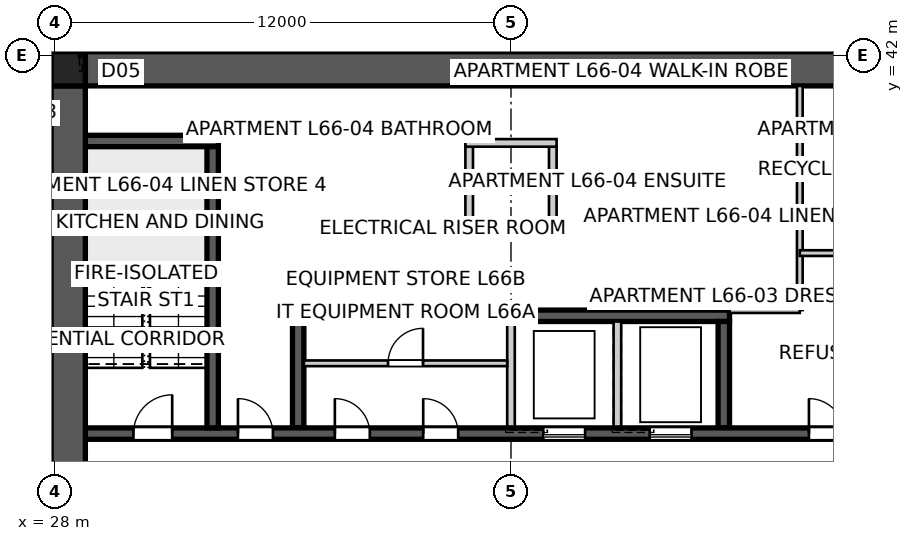
"""IFC4 building model, lengths in metres.
Left out: names, types, materials, properties, quantities, classifications, styles, units other than length and angle.
Written with IfcOpenShell. Run it as: python <this file> out.ifc"""

import sys

from ifc_helpers import new_model, si_unit, direction, frame, frame_2d, origin, origin_2d, place, context, subcontext, project, spatial, polyline, rectangle, outline, extrude, element, fill, save


model = new_model("IFC4")
c1 = context("Model", 3, precision=1e-05, world=origin(), true_north=direction((0.0, 1.0)))
c2 = subcontext(c1, "Body", "Model", "MODEL_VIEW")
j1 = project(units=[si_unit("LENGTHUNIT", "METRE"), si_unit("PLANEANGLEUNIT", "RADIAN")], contexts=[c1])
p1 = place(None, origin())
s1 = spatial("IfcSite", under=j1, at=p1, CompositionType="ELEMENT")
p2 = place(p1, origin())
s2 = spatial("IfcBuilding", under=s1, at=p2, CompositionType="ELEMENT")
p3 = place(p2, frame((0.0, 0.0, 240.4)))
s3 = spatial("IfcBuildingStorey", under=s2, at=p3, CompositionType="ELEMENT", Elevation=240.4)
p4 = place(p3, frame((28.8, 41.65, 0.0), z_axis=(0.0, 0.0, 1.0), x_axis=(1.0, 0.0, 0.0)))
e1 = element("IfcWall", 1, at=p4, inside=s3, PredefinedType="SHEAR", context=c2, shape_type="SweptSolid", body=[
    extrude(outline(polyline([(0.0, -0.45), (22.4, -0.45), (22.4, -0.025), (22.85, -0.025), (22.85, 0.025), (22.4, 0.025), (22.4, 0.45), (0.0, 0.45), (0.0, 0.025), (-0.45, 0.025), (-0.45, -0.025), (0.0, -0.025), (0.0, -0.45)])), origin(), (0.0, 0.0, 1.0), 3.4),
])
p5 = place(p3, frame((28.35, 41.2, 0.0), z_axis=(0.0, 0.0, 1.0), x_axis=(0.0, -1.0, 0.0)))
e2 = element("IfcWall", 2, at=p5, inside=s3, PredefinedType="SHEAR", context=c2, shape_type="SweptSolid", body=[
    extrude(outline(polyline([(0.0, -0.45), (22.4, -0.45), (22.4, -0.025), (22.85, -0.025), (22.85, 0.025), (22.4, 0.025), (22.4, 0.45), (0.0, 0.45), (0.0, 0.025), (-0.45, 0.025), (-0.45, -0.025), (0.0, -0.025), (0.0, -0.45)])), origin(), (0.0, 0.0, 1.0), 3.4),
])
p6 = place(p5, frame((11.14, 0.0, 0.0)))
e3 = element("IfcOpeningElement", 3, at=p6, cuts=e2, PredefinedType="OPENING", context=c2, shape_type="SweptSolid", body=[
    extrude(rectangle(XDim=1.02, YDim=2.4, at=frame_2d((0.51, 1.2))), frame((0.0, 0.46, 0.0), z_axis=(0.0, -1.0, 0.0), x_axis=(1.0, 0.0, 0.0)), (0.0, 0.0, 1.0), 0.92),
])
p7 = place(p3, frame((28.8, 32.05, 0.0), z_axis=(0.0, 0.0, 1.0), x_axis=(1.0, 0.0, 0.0)))
e4 = element("IfcWall", 4, at=p7, inside=s3, PredefinedType="SHEAR", context=c2, shape_type="SweptSolid", body=[
    extrude(rectangle(XDim=22.4, YDim=0.3, at=frame_2d((11.2, 0.0))), origin(), (0.0, 0.0, 1.0), 3.4),
])
p8 = place(p7, frame((19.04, 0.0, 0.0)))
e5 = element("IfcOpeningElement", 5, at=p8, cuts=e4, PredefinedType="OPENING", context=c2, shape_type="SweptSolid", body=[
    extrude(rectangle(XDim=0.92, YDim=2.1, at=frame_2d((0.46, 1.05))), frame((0.0, 0.16, 0.0), z_axis=(0.0, -1.0, 0.0), x_axis=(1.0, 0.0, 0.0)), (0.0, 0.0, 1.0), 0.32),
])
p9 = place(p7, frame((1.265, 0.0, 0.0)))
e6 = element("IfcOpeningElement", 6, at=p9, cuts=e4, PredefinedType="OPENING", context=c2, shape_type="SweptSolid", body=[
    extrude(rectangle(XDim=1.02, YDim=2.1, at=frame_2d((0.51, 1.05))), frame((0.0, 0.16, 0.0), z_axis=(0.0, -1.0, 0.0), x_axis=(1.0, 0.0, 0.0)), (0.0, 0.0, 1.0), 0.32),
])
p10 = place(p7, frame((4.015, 0.0, 0.0)))
e7 = element("IfcOpeningElement", 7, at=p10, cuts=e4, PredefinedType="OPENING", context=c2, shape_type="SweptSolid", body=[
    extrude(rectangle(XDim=0.92, YDim=2.1, at=frame_2d((0.46, 1.05))), frame((0.0, 0.16, 0.0), z_axis=(0.0, -1.0, 0.0), x_axis=(1.0, 0.0, 0.0)), (0.0, 0.0, 1.0), 0.32),
])
p11 = place(p7, frame((6.565, 0.0, 0.0)))
e8 = element("IfcOpeningElement", 8, at=p11, cuts=e4, PredefinedType="OPENING", context=c2, shape_type="SweptSolid", body=[
    extrude(rectangle(XDim=0.92, YDim=2.1, at=frame_2d((0.46, 1.05))), frame((0.0, 0.16, 0.0), z_axis=(0.0, -1.0, 0.0), x_axis=(1.0, 0.0, 0.0)), (0.0, 0.0, 1.0), 0.32),
])
p12 = place(p7, frame((8.89, 0.0, 0.0)))
e9 = element("IfcOpeningElement", 9, at=p12, cuts=e4, PredefinedType="OPENING", context=c2, shape_type="SweptSolid", body=[
    extrude(rectangle(XDim=0.92, YDim=2.1, at=frame_2d((0.46, 1.05))), frame((0.0, 0.16, 0.0), z_axis=(0.0, -1.0, 0.0), x_axis=(1.0, 0.0, 0.0)), (0.0, 0.0, 1.0), 0.32),
])
p13 = place(p7, frame((12.05, 0.0, 0.0)))
e10 = element("IfcOpeningElement", 10, at=p13, cuts=e4, PredefinedType="OPENING", context=c2, shape_type="SweptSolid", body=[
    extrude(rectangle(XDim=1.1, YDim=2.1, at=frame_2d((0.55, 1.05))), frame((0.0, 0.16, 0.0), z_axis=(0.0, -1.0, 0.0), x_axis=(1.0, 0.0, 0.0)), (0.0, 0.0, 1.0), 0.32),
])
p14 = place(p7, frame((14.85, 0.0, 0.0)))
e11 = element("IfcOpeningElement", 11, at=p14, cuts=e4, PredefinedType="OPENING", context=c2, shape_type="SweptSolid", body=[
    extrude(rectangle(XDim=1.1, YDim=2.1, at=frame_2d((0.55, 1.05))), frame((0.0, 0.16, 0.0), z_axis=(0.0, -1.0, 0.0), x_axis=(1.0, 0.0, 0.0)), (0.0, 0.0, 1.0), 0.32),
])
p15 = place(p3, frame((34.25, 35.15, 0.0), z_axis=(0.0, 0.0, 1.0), x_axis=(1.0, 0.0, 0.0)))
e12 = element("IfcWall", 12, at=p15, inside=s3, PredefinedType="SHEAR", context=c2, shape_type="SweptSolid", body=[
    extrude(rectangle(XDim=11.5, YDim=0.3, at=frame_2d((5.75, 0.0))), origin(), (0.0, 0.0, 1.0), 3.4),
])
p16 = place(p3, frame((34.4, 32.2, 0.0), z_axis=(0.0, 0.0, 1.0), x_axis=(0.0, 1.0, 0.0)))
e13 = element("IfcWall", 13, at=p16, inside=s3, PredefinedType="SHEAR", context=c2, shape_type="SweptSolid", body=[
    extrude(rectangle(XDim=2.8, YDim=0.3, at=frame_2d((1.4, 0.0))), origin(), (0.0, 0.0, 1.0), 3.4),
])
for number, where, z_axis, x_axis in (
    (14, (40.0, 32.2, 0.0), (0.0, 0.0, 1.0), (0.0, 1.0, 0.0)),
    (15, (42.8, 32.2, 0.0), (0.0, 0.0, 1.0), (0.0, 1.0, 0.0)),
):
    element("IfcWall", number, at=place(p3, frame(where, z_axis=z_axis, x_axis=x_axis)), inside=s3, PredefinedType="SOLIDWALL", context=c2, shape_type="SweptSolid", body=[
        extrude(rectangle(XDim=2.8, YDim=0.2, at=frame_2d((1.4, 0.0))), origin(), (0.0, 0.0, 1.0), 3.4),
    ])
p17 = place(p3, frame((45.6, 32.2, 0.0), z_axis=(0.0, 0.0, 1.0), x_axis=(0.0, 1.0, 0.0)))
e16 = element("IfcWall", 16, at=p17, inside=s3, PredefinedType="SHEAR", context=c2, shape_type="SweptSolid", body=[
    extrude(rectangle(XDim=2.8, YDim=0.3, at=frame_2d((1.4, 0.0))), origin(), (0.0, 0.0, 1.0), 3.4),
])
p18 = place(p3, frame((32.15, 32.2, 0.0), z_axis=(0.0, 0.0, 1.0), x_axis=(0.0, 1.0, 0.0)))
e17 = element("IfcWall", 17, at=p18, inside=s3, PredefinedType="SHEAR", context=c2, shape_type="SweptSolid", body=[
    extrude(rectangle(XDim=7.7, YDim=0.3, at=frame_2d((3.85, 0.0))), origin(), (0.0, 0.0, 1.0), 3.4),
])
p19 = place(p3, frame((28.8, 39.75, 0.0), z_axis=(0.0, 0.0, 1.0), x_axis=(1.0, 0.0, 0.0)))
e18 = element("IfcWall", 18, at=p19, inside=s3, PredefinedType="SHEAR", context=c2, shape_type="SweptSolid", body=[
    extrude(rectangle(XDim=3.5, YDim=0.3, at=frame_2d((1.75, 0.0))), origin(), (0.0, 0.0, 1.0), 3.4),
])
for number, where, z_axis, x_axis in (
    (19, (38.9, 37.6, 0.0), (0.0, 0.0, 1.0), (0.0, 1.0, 0.0)),
    (20, (41.1, 37.6, 0.0), (0.0, 0.0, 1.0), (0.0, 1.0, 0.0)),
):
    element("IfcWall", number, at=place(p3, frame(where, z_axis=z_axis, x_axis=x_axis)), inside=s3, PredefinedType="SOLIDWALL", context=c2, shape_type="SweptSolid", body=[
        extrude(rectangle(XDim=2.0, YDim=0.2, at=frame_2d((1.0, 0.0))), origin(), (0.0, 0.0, 1.0), 3.4),
    ])
for number, where, z_axis, x_axis in (
    (21, (38.8, 37.5, 0.0), (0.0, 0.0, 1.0), (1.0, 0.0, 0.0)),
    (22, (38.8, 39.7, 0.0), (0.0, 0.0, 1.0), (1.0, 0.0, 0.0)),
):
    element("IfcWall", number, at=place(p3, frame(where, z_axis=z_axis, x_axis=x_axis)), inside=s3, PredefinedType="SOLIDWALL", context=c2, shape_type="SweptSolid", body=[
        extrude(rectangle(XDim=2.4, YDim=0.2, at=frame_2d((1.2, 0.0))), origin(), (0.0, 0.0, 1.0), 3.4),
    ])
p20 = place(p3, frame((28.35, 41.65, 0.0), z_axis=(0.0, 0.0, 1.0), x_axis=(1.0, 0.0, 0.0)))
e23 = element("IfcColumn", 23, at=p20, inside=s3, PredefinedType="COLUMN", context=c2, shape_type="SweptSolid", body=[
    extrude(rectangle(XDim=0.9, YDim=0.9, at=origin_2d()), origin(), (0.0, 0.0, 1.0), 3.4),
])
p21 = place(p3, frame((47.6, 41.2, 0.0), z_axis=(0.0, 0.0, 1.0), x_axis=(0.0, -1.0, 0.0)))
e24 = element("IfcWall", 24, at=p21, inside=s3, PredefinedType="SOLIDWALL", context=c2, shape_type="SweptSolid", body=[
    extrude(rectangle(XDim=5.9, YDim=0.15, at=frame_2d((2.95, 0.0))), origin(), (0.0, 0.0, 1.0), 3.25),
])
p22 = place(p3, frame((47.6, 35.3, 0.0), z_axis=(0.0, 0.0, 1.0), x_axis=(-1.0, 0.0, 0.0)))
e25 = element("IfcWall", 25, at=p22, inside=s3, PredefinedType="SOLIDWALL", context=c2, shape_type="SweptSolid", body=[
    extrude(rectangle(XDim=1.85, YDim=0.15, at=frame_2d((0.925, 0.0))), origin(), (0.0, 0.0, 1.0), 3.25),
])
p23 = place(p3, frame((47.6, 36.8, 0.0), z_axis=(0.0, 0.0, 1.0), x_axis=(1.0, 0.0, 0.0)))
e26 = element("IfcWall", 26, at=p23, inside=s3, PredefinedType="SOLIDWALL", context=c2, shape_type="SweptSolid", body=[
    extrude(rectangle(XDim=3.6, YDim=0.15, at=frame_2d((1.8, 0.0))), origin(), (0.0, 0.0, 1.0), 3.25),
])
p24 = place(p23, frame((1.34, 0.0, 0.0)))
e27 = element("IfcOpeningElement", 27, at=p24, cuts=e26, PredefinedType="OPENING", context=c2, shape_type="SweptSolid", body=[
    extrude(rectangle(XDim=0.92, YDim=2.1, at=frame_2d((0.46, 1.05))), frame((0.0, 0.085, 0.0), z_axis=(0.0, -1.0, 0.0), x_axis=(1.0, 0.0, 0.0)), (0.0, 0.0, 1.0), 0.17),
])
p25 = place(p3, frame((28.708, 41.18, 0.0), z_axis=(0.0, 0.0, 1.0), x_axis=(0.0, 1.0, 0.0)))
e28 = element("IfcWall", 28, at=p25, inside=s3, PredefinedType="PARTITIONING", context=c2, shape_type="SweptSolid", body=[
    extrude(rectangle(XDim=2.458, YDim=0.12, at=frame_2d((1.229, 0.0))), origin(), (0.0, 0.0, 1.0), 3.25),
])
p26 = place(p25, frame((1.259, 0.0, 0.0)))
e29 = element("IfcOpeningElement", 29, at=p26, cuts=e28, PredefinedType="OPENING", context=c2, shape_type="SweptSolid", body=[
    extrude(rectangle(XDim=0.96, YDim=2.1, at=frame_2d((0.48, 1.05))), frame((0.0, 0.07, 0.0), z_axis=(0.0, -1.0, 0.0), x_axis=(1.0, 0.0, 0.0)), (0.0, 0.0, 1.0), 0.14),
])
p27 = place(p3, frame((34.55, 33.9, 0.0), z_axis=(0.0, 0.0, 1.0), x_axis=(1.0, 0.0, 0.0)))
e30 = element("IfcWall", 30, at=p27, inside=s3, PredefinedType="SOLIDWALL", context=c2, shape_type="SweptSolid", body=[
    extrude(rectangle(XDim=5.35, YDim=0.15, at=frame_2d((2.675, 0.0))), origin(), (0.0, 0.0, 1.0), 3.25),
])
p28 = place(p27, frame((2.215, 0.0, 0.0)))
e31 = element("IfcOpeningElement", 31, at=p28, cuts=e30, PredefinedType="OPENING", context=c2, shape_type="SweptSolid", body=[
    extrude(rectangle(XDim=0.92, YDim=2.1, at=frame_2d((0.46, 1.05))), frame((0.0, 0.085, 0.0), z_axis=(0.0, -1.0, 0.0), x_axis=(1.0, 0.0, 0.0)), (0.0, 0.0, 1.0), 0.17),
])
p29 = place(p8, origin())
e32 = element("IfcDoor", 32, at=p29, inside=s3, OperationType="SINGLE_SWING_LEFT", PredefinedType="DOOR", context=c2, shape_type="SweptSolid", body=[
    extrude(rectangle(XDim=0.92, YDim=2.1, at=frame_2d((0.46, 1.05))), frame((0.0, 0.025, 0.0), z_axis=(0.0, -1.0, 0.0), x_axis=(1.0, 0.0, 0.0)), (0.0, 0.0, 1.0), 0.05),
])
fill(e5, e32)
p30 = place(p9, origin())
e33 = element("IfcDoor", 33, at=p30, inside=s3, OperationType="SINGLE_SWING_RIGHT", PredefinedType="DOOR", context=c2, shape_type="SweptSolid", body=[
    extrude(rectangle(XDim=1.02, YDim=2.1, at=frame_2d((0.51, 1.05))), frame((0.0, 0.025, 0.0), z_axis=(0.0, -1.0, 0.0), x_axis=(1.0, 0.0, 0.0)), (0.0, 0.0, 1.0), 0.05),
])
fill(e6, e33)
p31 = place(p10, origin())
e34 = element("IfcDoor", 34, at=p31, inside=s3, OperationType="SINGLE_SWING_LEFT", PredefinedType="DOOR", context=c2, shape_type="SweptSolid", body=[
    extrude(rectangle(XDim=0.92, YDim=2.1, at=frame_2d((0.46, 1.05))), frame((0.0, 0.025, 0.0), z_axis=(0.0, -1.0, 0.0), x_axis=(1.0, 0.0, 0.0)), (0.0, 0.0, 1.0), 0.05),
])
fill(e7, e34)
p32 = place(p11, origin())
e35 = element("IfcDoor", 35, at=p32, inside=s3, OperationType="SINGLE_SWING_LEFT", PredefinedType="DOOR", context=c2, shape_type="SweptSolid", body=[
    extrude(rectangle(XDim=0.92, YDim=2.1, at=frame_2d((0.46, 1.05))), frame((0.0, 0.025, 0.0), z_axis=(0.0, -1.0, 0.0), x_axis=(1.0, 0.0, 0.0)), (0.0, 0.0, 1.0), 0.05),
])
fill(e8, e35)
p33 = place(p12, origin())
e36 = element("IfcDoor", 36, at=p33, inside=s3, OperationType="SINGLE_SWING_LEFT", PredefinedType="DOOR", context=c2, shape_type="SweptSolid", body=[
    extrude(rectangle(XDim=0.92, YDim=2.1, at=frame_2d((0.46, 1.05))), frame((0.0, 0.025, 0.0), z_axis=(0.0, -1.0, 0.0), x_axis=(1.0, 0.0, 0.0)), (0.0, 0.0, 1.0), 0.05),
])
fill(e9, e36)
p34 = place(p28, origin())
e37 = element("IfcDoor", 37, at=p34, inside=s3, OperationType="SINGLE_SWING_RIGHT", PredefinedType="DOOR", context=c2, shape_type="SweptSolid", body=[
    extrude(rectangle(XDim=0.92, YDim=2.1, at=frame_2d((0.46, 1.05))), frame((0.0, 0.025, 0.0), z_axis=(0.0, -1.0, 0.0), x_axis=(1.0, 0.0, 0.0)), (0.0, 0.0, 1.0), 0.05),
])
fill(e31, e37)
p35 = place(p13, origin())
e38 = element("IfcDoor", 38, at=p35, inside=s3, OperationType="SLIDING_TO_LEFT", PredefinedType="DOOR", context=c2, shape_type="SweptSolid", body=[
    extrude(rectangle(XDim=1.1, YDim=2.1, at=frame_2d((0.55, 1.05))), frame((0.0, 0.025, 0.0), z_axis=(0.0, -1.0, 0.0), x_axis=(1.0, 0.0, 0.0)), (0.0, 0.0, 1.0), 0.05),
])
fill(e10, e38)
p36 = place(p14, origin())
e39 = element("IfcDoor", 39, at=p36, inside=s3, OperationType="SLIDING_TO_LEFT", PredefinedType="DOOR", context=c2, shape_type="SweptSolid", body=[
    extrude(rectangle(XDim=1.1, YDim=2.1, at=frame_2d((0.55, 1.05))), frame((0.0, 0.025, 0.0), z_axis=(0.0, -1.0, 0.0), x_axis=(1.0, 0.0, 0.0)), (0.0, 0.0, 1.0), 0.05),
])
fill(e11, e39)
save(model, sys.argv[1])
